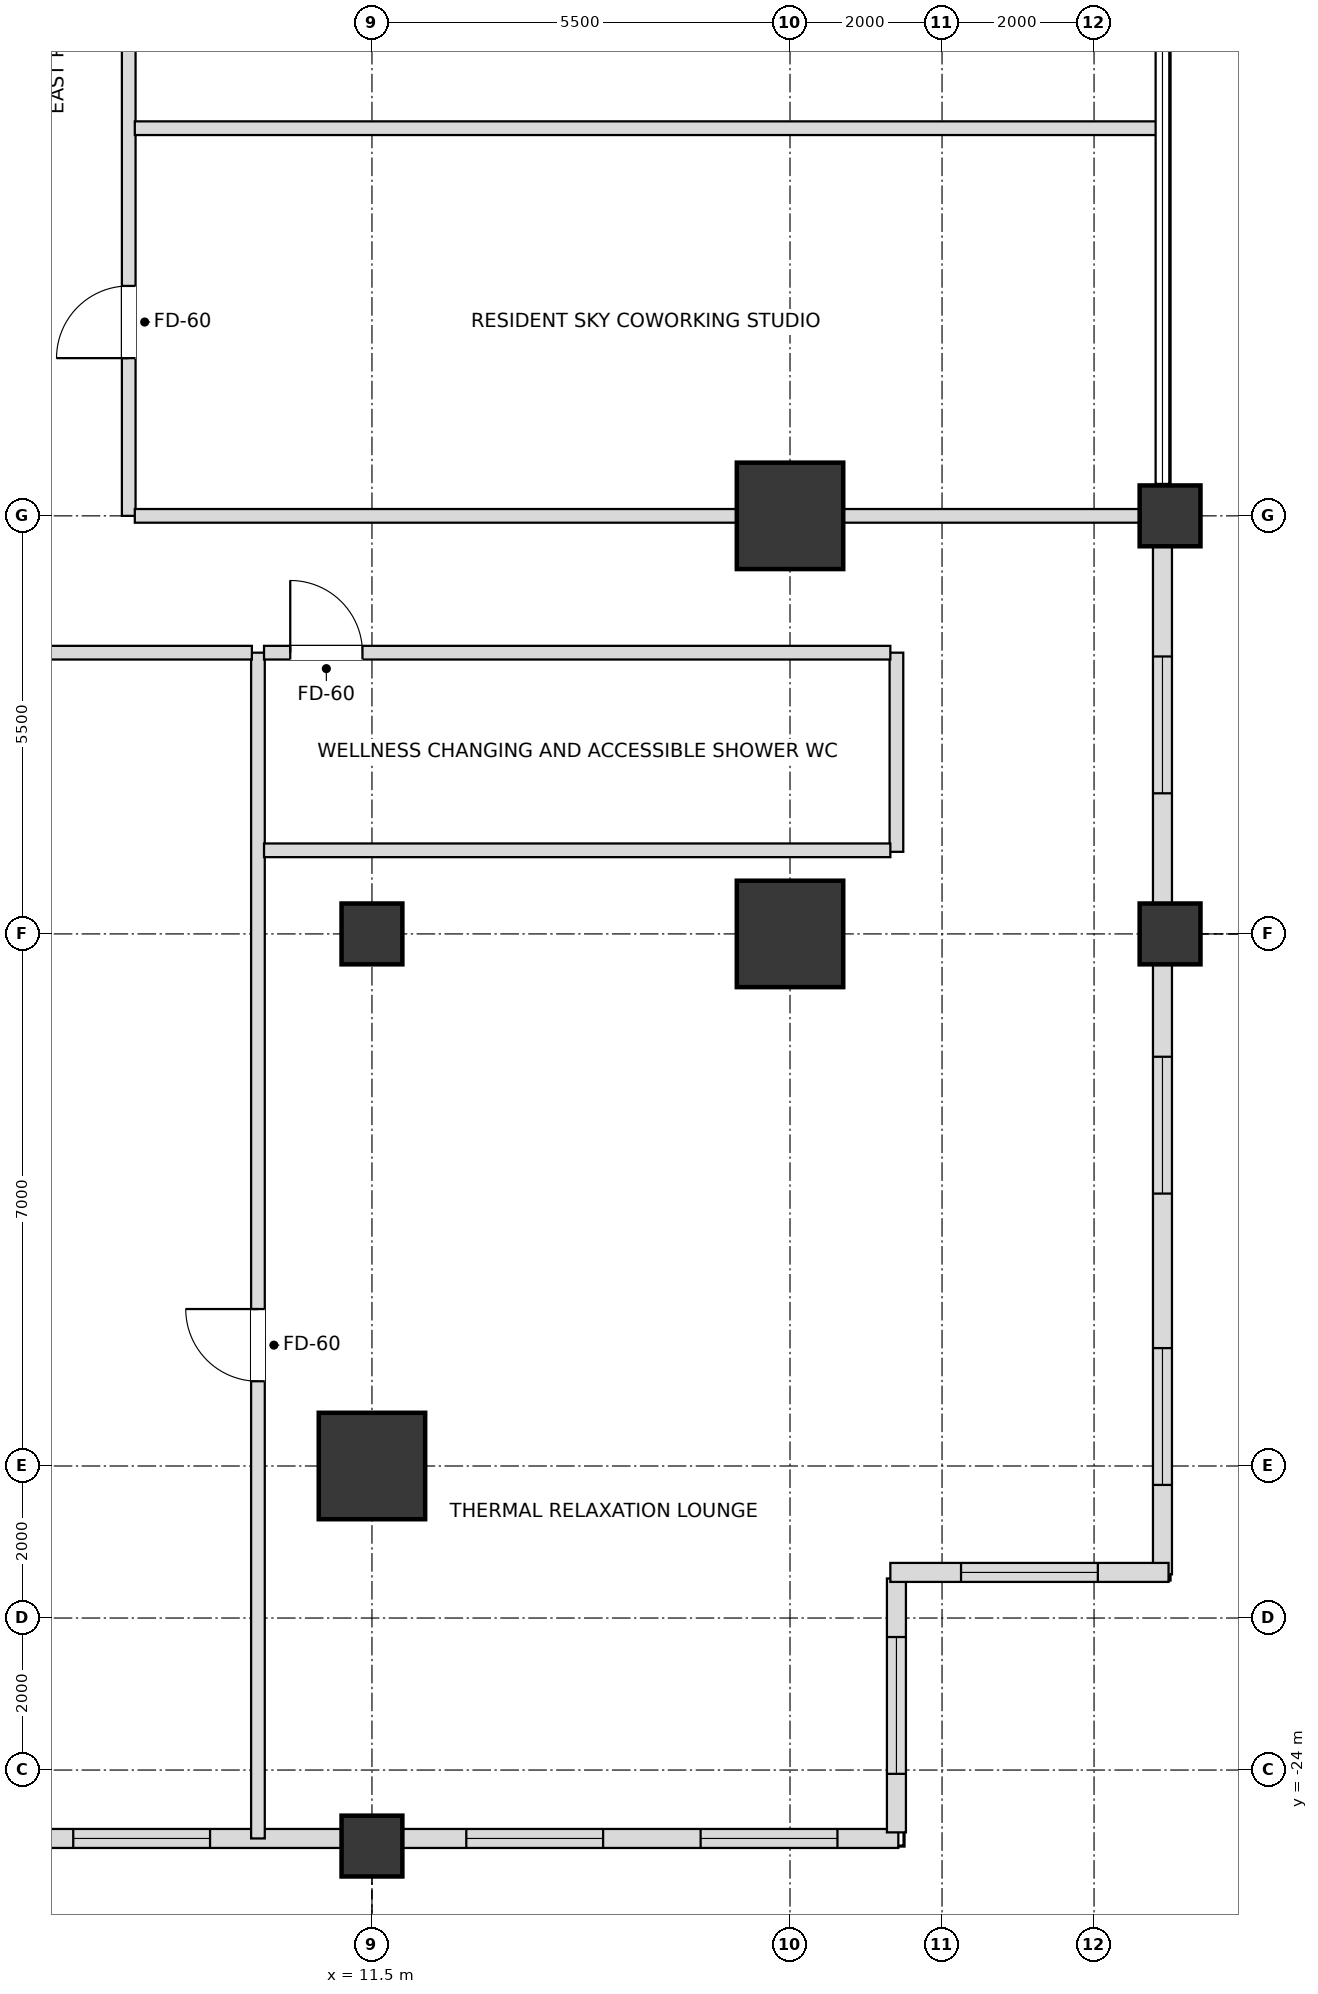
"""IFC4 building model, lengths in metres.
Left out: names, types, materials, properties, quantities, classifications, styles, units other than length and angle.
Written with IfcOpenShell. Run it as: python <this file> out.ifc"""

import sys

from ifc_helpers import new_model, si_unit, direction, frame, frame_2d, origin, origin_2d, place, context, subcontext, project, spatial, rectangle, extrude, element, fill, save


model = new_model("IFC4")
c1 = context("Model", 3, precision=1e-05, world=origin(), true_north=direction((0.0, 1.0)))
c2 = subcontext(c1, "Body", "Model", "MODEL_VIEW")
j1 = project(units=[si_unit("LENGTHUNIT", "METRE"), si_unit("PLANEANGLEUNIT", "RADIAN")], contexts=[c1])
p1 = place(None, origin())
s1 = spatial("IfcSite", under=j1, at=p1, CompositionType="ELEMENT")
p2 = place(p1, origin())
s2 = spatial("IfcBuilding", under=s1, at=p2, CompositionType="ELEMENT")
p3 = place(p2, frame((0.0, 0.0, 82.8)))
s3 = spatial("IfcBuildingStorey", under=s2, at=p3, CompositionType="ELEMENT", Elevation=82.8)
for number, where, z_axis, x_axis in (
    (1, (11.5, -20.0, 0.0), (0.0, 0.0, 1.0), (1.0, 0.0, 0.0)),
    (2, (17.0, -13.0, 0.0), (0.0, 0.0, 1.0), (1.0, 0.0, 0.0)),
    (3, (17.0, -7.5, 0.0), (0.0, 0.0, 1.0), (1.0, 0.0, 0.0)),
):
    element("IfcColumn", number, at=place(p3, frame(where, z_axis=z_axis, x_axis=x_axis)), inside=s3, PredefinedType="USERDEFINED", context=c2, shape_type="SweptSolid", body=[
        extrude(rectangle(XDim=1.4, YDim=1.4, at=origin_2d()), origin(), (0.0, 0.0, 1.0), 3.6),
    ])
for number, where, z_axis, x_axis in (
    (4, (11.5, -13.0, 0.0), (0.0, 0.0, 1.0), (1.0, 0.0, 0.0)),
    (5, (11.5, -25.0, 0.0), (0.0, 0.0, 1.0), (1.0, 0.0, 0.0)),
    (6, (22.0, -13.0, 0.0), (0.0, 0.0, 1.0), (1.0, 0.0, 0.0)),
    (7, (22.0, -7.5, 0.0), (0.0, 0.0, 1.0), (1.0, 0.0, 0.0)),
):
    element("IfcColumn", number, at=place(p3, frame(where, z_axis=z_axis, x_axis=x_axis)), inside=s3, PredefinedType="COLUMN", context=c2, shape_type="SweptSolid", body=[
        extrude(rectangle(XDim=0.8, YDim=0.8, at=origin_2d()), origin(), (0.0, 0.0, 1.0), 3.6),
    ])
p4 = place(p3, frame((6.895, -24.9, 0.0), z_axis=(0.0, 0.0, 1.0), x_axis=(1.0, 0.0, 0.0)))
e8 = element("IfcWall", 8, at=p4, inside=s3, PredefinedType="SOLIDWALL", context=c2, shape_type="SweptSolid", body=[
    extrude(rectangle(XDim=4.21, YDim=0.25, at=frame_2d((2.105, 0.0))), origin(), (0.0, 0.0, 1.0), 2.736),
])
p5 = place(p4, frame((0.675, 0.0, 0.72)))
e9 = element("IfcOpeningElement", 9, at=p5, cuts=e8, PredefinedType="OPENING", context=c2, shape_type="SweptSolid", body=[
    extrude(rectangle(XDim=1.8, YDim=1.68, at=frame_2d((0.9, 0.84))), frame((0.0, 0.135, 0.0), z_axis=(0.0, -1.0, 0.0), x_axis=(1.0, 0.0, 0.0)), (0.0, 0.0, 1.0), 0.27),
])
p6 = place(p3, frame((11.895, -24.9, 0.0), z_axis=(0.0, 0.0, 1.0), x_axis=(1.0, 0.0, 0.0)))
e10 = element("IfcWall", 10, at=p6, inside=s3, PredefinedType="SOLIDWALL", context=c2, shape_type="SweptSolid", body=[
    extrude(rectangle(XDim=6.53, YDim=0.25, at=frame_2d((3.265, 0.0))), origin(), (0.0, 0.0, 1.0), 2.736),
])
p7 = place(p6, frame((0.846, 0.0, 0.72)))
e11 = element("IfcOpeningElement", 11, at=p7, cuts=e10, PredefinedType="OPENING", context=c2, shape_type="SweptSolid", body=[
    extrude(rectangle(XDim=1.8, YDim=1.68, at=frame_2d((0.9, 0.84))), frame((0.0, 0.135, 0.0), z_axis=(0.0, -1.0, 0.0), x_axis=(1.0, 0.0, 0.0)), (0.0, 0.0, 1.0), 0.27),
])
p8 = place(p6, frame((3.929, 0.0, 0.72)))
e12 = element("IfcOpeningElement", 12, at=p8, cuts=e10, PredefinedType="OPENING", context=c2, shape_type="SweptSolid", body=[
    extrude(rectangle(XDim=1.8, YDim=1.68, at=frame_2d((0.9, 0.84))), frame((0.0, 0.135, 0.0), z_axis=(0.0, -1.0, 0.0), x_axis=(1.0, 0.0, 0.0)), (0.0, 0.0, 1.0), 0.27),
])
p9 = place(p3, frame((21.9, -21.425, 0.0), z_axis=(0.0, 0.0, 1.0), x_axis=(0.0, 1.0, 0.0)))
e13 = element("IfcWall", 13, at=p9, inside=s3, PredefinedType="SOLIDWALL", context=c2, shape_type="SweptSolid", body=[
    extrude(rectangle(XDim=8.03, YDim=0.25, at=frame_2d((4.015, 0.0))), origin(), (0.0, 0.0, 1.0), 2.736),
])
p10 = place(p9, frame((1.176, 0.0, 0.72)))
e14 = element("IfcOpeningElement", 14, at=p10, cuts=e13, PredefinedType="OPENING", context=c2, shape_type="SweptSolid", body=[
    extrude(rectangle(XDim=1.8, YDim=1.68, at=frame_2d((0.9, 0.84))), frame((0.0, 0.135, 0.0), z_axis=(0.0, -1.0, 0.0), x_axis=(1.0, 0.0, 0.0)), (0.0, 0.0, 1.0), 0.27),
])
p11 = place(p9, frame((5.009, 0.0, 0.72)))
e15 = element("IfcOpeningElement", 15, at=p11, cuts=e13, PredefinedType="OPENING", context=c2, shape_type="SweptSolid", body=[
    extrude(rectangle(XDim=1.8, YDim=1.68, at=frame_2d((0.9, 0.84))), frame((0.0, 0.135, 0.0), z_axis=(0.0, -1.0, 0.0), x_axis=(1.0, 0.0, 0.0)), (0.0, 0.0, 1.0), 0.27),
])
p12 = place(p3, frame((21.9, -12.605, 0.0), z_axis=(0.0, 0.0, 1.0), x_axis=(0.0, 1.0, 0.0)))
e16 = element("IfcWall", 16, at=p12, inside=s3, PredefinedType="SOLIDWALL", context=c2, shape_type="SweptSolid", body=[
    extrude(rectangle(XDim=4.71, YDim=0.25, at=frame_2d((2.355, 0.0))), origin(), (0.0, 0.0, 1.0), 2.736),
])
p13 = place(p12, frame((1.455, 0.0, 0.72)))
e17 = element("IfcOpeningElement", 17, at=p13, cuts=e16, PredefinedType="OPENING", context=c2, shape_type="SweptSolid", body=[
    extrude(rectangle(XDim=1.8, YDim=1.68, at=frame_2d((0.9, 0.84))), frame((0.0, 0.135, 0.0), z_axis=(0.0, -1.0, 0.0), x_axis=(1.0, 0.0, 0.0)), (0.0, 0.0, 1.0), 0.27),
])
p14 = place(p3, frame((18.4, -24.82, 0.0), z_axis=(0.0, 0.0, 1.0), x_axis=(0.0, 1.0, 0.0)))
e18 = element("IfcWall", 18, at=p14, inside=s3, PredefinedType="SOLIDWALL", context=c2, shape_type="SweptSolid", body=[
    extrude(rectangle(XDim=3.34, YDim=0.25, at=frame_2d((1.67, 0.0))), origin(), (0.0, 0.0, 1.0), 2.736),
])
p15 = place(p14, frame((0.77, 0.0, 0.72)))
e19 = element("IfcOpeningElement", 19, at=p15, cuts=e18, PredefinedType="OPENING", context=c2, shape_type="SweptSolid", body=[
    extrude(rectangle(XDim=1.8, YDim=1.68, at=frame_2d((0.9, 0.84))), frame((0.0, 0.135, 0.0), z_axis=(0.0, -1.0, 0.0), x_axis=(1.0, 0.0, 0.0)), (0.0, 0.0, 1.0), 0.27),
])
p16 = place(p3, frame((18.32, -21.4, 0.0), z_axis=(0.0, 0.0, 1.0), x_axis=(1.0, 0.0, 0.0)))
e20 = element("IfcWall", 20, at=p16, inside=s3, PredefinedType="SOLIDWALL", context=c2, shape_type="SweptSolid", body=[
    extrude(rectangle(XDim=3.66, YDim=0.25, at=frame_2d((1.83, 0.0))), origin(), (0.0, 0.0, 1.0), 2.736),
])
p17 = place(p16, frame((0.93, 0.0, 0.72)))
e21 = element("IfcOpeningElement", 21, at=p17, cuts=e20, PredefinedType="OPENING", context=c2, shape_type="SweptSolid", body=[
    extrude(rectangle(XDim=1.8, YDim=1.68, at=frame_2d((0.9, 0.84))), frame((0.0, 0.135, 0.0), z_axis=(0.0, -1.0, 0.0), x_axis=(1.0, 0.0, 0.0)), (0.0, 0.0, 1.0), 0.27),
])
p18 = place(p3, frame((8.3, -7.5, 0.0), z_axis=(0.0, 0.0, 1.0), x_axis=(0.0, 1.0, 0.0)))
e22 = element("IfcWall", 22, at=p18, inside=s3, PredefinedType="PARTITIONING", context=c2, shape_type="SweptSolid", body=[
    extrude(rectangle(XDim=15.0, YDim=0.18, at=frame_2d((7.5, 0.0))), origin(), (0.0, 0.0, 1.0), 3.38),
])
p19 = place(p18, frame((2.075, 0.0, 0.0)))
e23 = element("IfcOpeningElement", 23, at=p19, cuts=e22, PredefinedType="OPENING", context=c2, shape_type="SweptSolid", body=[
    extrude(rectangle(XDim=0.95, YDim=2.15, at=frame_2d((0.475, 1.075))), frame((0.0, 0.1, 0.0), z_axis=(0.0, -1.0, 0.0), x_axis=(1.0, 0.0, 0.0)), (0.0, 0.0, 1.0), 0.2),
])
p20 = place(p18, frame((8.475, 0.0, 0.0)))
e24 = element("IfcOpeningElement", 24, at=p20, cuts=e22, PredefinedType="OPENING", context=c2, shape_type="SweptSolid", body=[
    extrude(rectangle(XDim=0.95, YDim=2.15, at=frame_2d((0.475, 1.075))), frame((0.0, 0.1, 0.0), z_axis=(0.0, -1.0, 0.0), x_axis=(1.0, 0.0, 0.0)), (0.0, 0.0, 1.0), 0.2),
])
p21 = place(p18, frame((13.425, 0.0, 0.0)))
e25 = element("IfcOpeningElement", 25, at=p21, cuts=e22, PredefinedType="OPENING", context=c2, shape_type="SweptSolid", body=[
    extrude(rectangle(XDim=0.95, YDim=2.15, at=frame_2d((0.475, 1.075))), frame((0.0, 0.1, 0.0), z_axis=(0.0, -1.0, 0.0), x_axis=(1.0, 0.0, 0.0)), (0.0, 0.0, 1.0), 0.2),
])
p22 = place(p3, frame((10.0, -24.9, 0.0), z_axis=(0.0, 0.0, 1.0), x_axis=(0.0, 1.0, 0.0)))
e26 = element("IfcWall", 26, at=p22, inside=s3, PredefinedType="PARTITIONING", context=c2, shape_type="SweptSolid", body=[
    extrude(rectangle(XDim=15.6, YDim=0.18, at=frame_2d((7.8, 0.0))), origin(), (0.0, 0.0, 1.0), 2.816),
])
p23 = place(p22, frame((6.015, 0.0, 0.0)))
e27 = element("IfcOpeningElement", 27, at=p23, cuts=e26, PredefinedType="OPENING", context=c2, shape_type="SweptSolid", body=[
    extrude(rectangle(XDim=0.95, YDim=2.15, at=frame_2d((0.475, 1.075))), frame((0.0, 0.1, 0.0), z_axis=(0.0, -1.0, 0.0), x_axis=(1.0, 0.0, 0.0)), (0.0, 0.0, 1.0), 0.2),
])
p24 = place(p3, frame((18.4, -11.92, 0.0), z_axis=(0.0, 0.0, 1.0), x_axis=(0.0, 1.0, 0.0)))
e28 = element("IfcWall", 28, at=p24, inside=s3, PredefinedType="PARTITIONING", context=c2, shape_type="SweptSolid", body=[
    extrude(rectangle(XDim=2.62, YDim=0.18, at=frame_2d((1.31, 0.0))), origin(), (0.0, 0.0, 1.0), 3.38),
])
p25 = place(p3, frame((10.08, -11.9, 0.0), z_axis=(0.0, 0.0, 1.0), x_axis=(1.0, 0.0, 0.0)))
e29 = element("IfcWall", 29, at=p25, inside=s3, PredefinedType="PARTITIONING", context=c2, shape_type="SweptSolid", body=[
    extrude(rectangle(XDim=8.24, YDim=0.18, at=frame_2d((4.12, 0.0))), origin(), (0.0, 0.0, 1.0), 2.816),
])
p26 = place(p3, frame((-2.87, -9.3, 0.0), z_axis=(0.0, 0.0, 1.0), x_axis=(1.0, 0.0, 0.0)))
e30 = element("IfcWall", 30, at=p26, inside=s3, PredefinedType="PARTITIONING", context=c2, shape_type="SweptSolid", body=[
    extrude(rectangle(XDim=12.79, YDim=0.18, at=frame_2d((6.395, 0.0))), origin(), (0.0, 0.0, 1.0), 2.816),
])
p27 = place(p26, frame((5.925, 0.0, 0.0)))
e31 = element("IfcOpeningElement", 31, at=p27, cuts=e30, PredefinedType="OPENING", context=c2, shape_type="SweptSolid", body=[
    extrude(rectangle(XDim=0.95, YDim=2.15, at=frame_2d((0.475, 1.075))), frame((0.0, 0.1, 0.0), z_axis=(0.0, -1.0, 0.0), x_axis=(1.0, 0.0, 0.0)), (0.0, 0.0, 1.0), 0.2),
])
p28 = place(p3, frame((10.08, -9.3, 0.0), z_axis=(0.0, 0.0, 1.0), x_axis=(1.0, 0.0, 0.0)))
e32 = element("IfcWall", 32, at=p28, inside=s3, PredefinedType="PARTITIONING", context=c2, shape_type="SweptSolid", body=[
    extrude(rectangle(XDim=8.24, YDim=0.18, at=frame_2d((4.12, 0.0))), origin(), (0.0, 0.0, 1.0), 2.816),
])
p29 = place(p28, frame((0.345, 0.0, 0.0)))
e33 = element("IfcOpeningElement", 33, at=p29, cuts=e32, PredefinedType="OPENING", context=c2, shape_type="SweptSolid", body=[
    extrude(rectangle(XDim=0.95, YDim=2.15, at=frame_2d((0.475, 1.075))), frame((0.0, 0.1, 0.0), z_axis=(0.0, -1.0, 0.0), x_axis=(1.0, 0.0, 0.0)), (0.0, 0.0, 1.0), 0.2),
])
p30 = place(p3, frame((8.38, -7.5, 0.0), z_axis=(0.0, 0.0, 1.0), x_axis=(1.0, 0.0, 0.0)))
e34 = element("IfcWall", 34, at=p30, inside=s3, PredefinedType="PARTITIONING", context=c2, shape_type="SweptSolid", body=[
    extrude(rectangle(XDim=13.52, YDim=0.18, at=frame_2d((6.76, 0.0))), origin(), (0.0, 0.0, 1.0), 2.816),
])
p31 = place(p3, frame((8.38, -2.4, 0.0), z_axis=(0.0, 0.0, 1.0), x_axis=(1.0, 0.0, 0.0)))
e35 = element("IfcWall", 35, at=p31, inside=s3, PredefinedType="PARTITIONING", context=c2, shape_type="SweptSolid", body=[
    extrude(rectangle(XDim=13.44, YDim=0.18, at=frame_2d((6.72, 0.0))), origin(), (0.0, 0.0, 1.0), 2.816),
])
p32 = place(p5, origin())
e36 = element("IfcWindow", 36, at=p32, inside=s3, PartitioningType="SINGLE_PANEL", PredefinedType="WINDOW", context=c2, shape_type="SweptSolid", body=[
    extrude(rectangle(XDim=1.8, YDim=1.68, at=frame_2d((0.9, 0.84))), frame((0.0, 0.03, 0.0), z_axis=(0.0, -1.0, 0.0), x_axis=(1.0, 0.0, 0.0)), (0.0, 0.0, 1.0), 0.06),
])
fill(e9, e36)
p33 = place(p7, origin())
e37 = element("IfcWindow", 37, at=p33, inside=s3, PartitioningType="SINGLE_PANEL", PredefinedType="WINDOW", context=c2, shape_type="SweptSolid", body=[
    extrude(rectangle(XDim=1.8, YDim=1.68, at=frame_2d((0.9, 0.84))), frame((0.0, 0.03, 0.0), z_axis=(0.0, -1.0, 0.0), x_axis=(1.0, 0.0, 0.0)), (0.0, 0.0, 1.0), 0.06),
])
fill(e11, e37)
p34 = place(p8, origin())
e38 = element("IfcWindow", 38, at=p34, inside=s3, PartitioningType="SINGLE_PANEL", PredefinedType="WINDOW", context=c2, shape_type="SweptSolid", body=[
    extrude(rectangle(XDim=1.8, YDim=1.68, at=frame_2d((0.9, 0.84))), frame((0.0, 0.03, 0.0), z_axis=(0.0, -1.0, 0.0), x_axis=(1.0, 0.0, 0.0)), (0.0, 0.0, 1.0), 0.06),
])
fill(e12, e38)
p35 = place(p10, origin())
e39 = element("IfcWindow", 39, at=p35, inside=s3, PartitioningType="SINGLE_PANEL", PredefinedType="WINDOW", context=c2, shape_type="SweptSolid", body=[
    extrude(rectangle(XDim=1.8, YDim=1.68, at=frame_2d((0.9, 0.84))), frame((0.0, 0.03, 0.0), z_axis=(0.0, -1.0, 0.0), x_axis=(1.0, 0.0, 0.0)), (0.0, 0.0, 1.0), 0.06),
])
fill(e14, e39)
p36 = place(p11, origin())
e40 = element("IfcWindow", 40, at=p36, inside=s3, PartitioningType="SINGLE_PANEL", PredefinedType="WINDOW", context=c2, shape_type="SweptSolid", body=[
    extrude(rectangle(XDim=1.8, YDim=1.68, at=frame_2d((0.9, 0.84))), frame((0.0, 0.03, 0.0), z_axis=(0.0, -1.0, 0.0), x_axis=(1.0, 0.0, 0.0)), (0.0, 0.0, 1.0), 0.06),
])
fill(e15, e40)
p37 = place(p13, origin())
e41 = element("IfcWindow", 41, at=p37, inside=s3, PartitioningType="SINGLE_PANEL", PredefinedType="WINDOW", context=c2, shape_type="SweptSolid", body=[
    extrude(rectangle(XDim=1.8, YDim=1.68, at=frame_2d((0.9, 0.84))), frame((0.0, 0.03, 0.0), z_axis=(0.0, -1.0, 0.0), x_axis=(1.0, 0.0, 0.0)), (0.0, 0.0, 1.0), 0.06),
])
fill(e17, e41)
p38 = place(p15, origin())
e42 = element("IfcWindow", 42, at=p38, inside=s3, PartitioningType="SINGLE_PANEL", PredefinedType="WINDOW", context=c2, shape_type="SweptSolid", body=[
    extrude(rectangle(XDim=1.8, YDim=1.68, at=frame_2d((0.9, 0.84))), frame((0.0, 0.03, 0.0), z_axis=(0.0, -1.0, 0.0), x_axis=(1.0, 0.0, 0.0)), (0.0, 0.0, 1.0), 0.06),
])
fill(e19, e42)
p39 = place(p17, origin())
e43 = element("IfcWindow", 43, at=p39, inside=s3, PartitioningType="SINGLE_PANEL", PredefinedType="WINDOW", context=c2, shape_type="SweptSolid", body=[
    extrude(rectangle(XDim=1.8, YDim=1.68, at=frame_2d((0.9, 0.84))), frame((0.0, 0.03, 0.0), z_axis=(0.0, -1.0, 0.0), x_axis=(1.0, 0.0, 0.0)), (0.0, 0.0, 1.0), 0.06),
])
fill(e21, e43)
p40 = place(p29, origin())
e44 = element("IfcDoor", 44, at=p40, inside=s3, OperationType="SINGLE_SWING_LEFT", PredefinedType="DOOR", context=c2, shape_type="SweptSolid", body=[
    extrude(rectangle(XDim=0.95, YDim=2.15, at=frame_2d((0.475, 1.075))), frame((0.0, 0.025, 0.0), z_axis=(0.0, -1.0, 0.0), x_axis=(1.0, 0.0, 0.0)), (0.0, 0.0, 1.0), 0.05),
])
fill(e33, e44)
p41 = place(p23, origin())
e45 = element("IfcDoor", 45, at=p41, inside=s3, OperationType="SINGLE_SWING_RIGHT", PredefinedType="DOOR", context=c2, shape_type="SweptSolid", body=[
    extrude(rectangle(XDim=0.95, YDim=2.15, at=frame_2d((0.475, 1.075))), frame((0.0, 0.025, 0.0), z_axis=(0.0, -1.0, 0.0), x_axis=(1.0, 0.0, 0.0)), (0.0, 0.0, 1.0), 0.05),
])
fill(e27, e45)
p42 = place(p19, origin())
e46 = element("IfcDoor", 46, at=p42, inside=s3, OperationType="SINGLE_SWING_LEFT", PredefinedType="DOOR", context=c2, shape_type="SweptSolid", body=[
    extrude(rectangle(XDim=0.95, YDim=2.15, at=frame_2d((0.475, 1.075))), frame((0.0, 0.025, 0.0), z_axis=(0.0, -1.0, 0.0), x_axis=(1.0, 0.0, 0.0)), (0.0, 0.0, 1.0), 0.05),
])
fill(e23, e46)
save(model, sys.argv[1])
